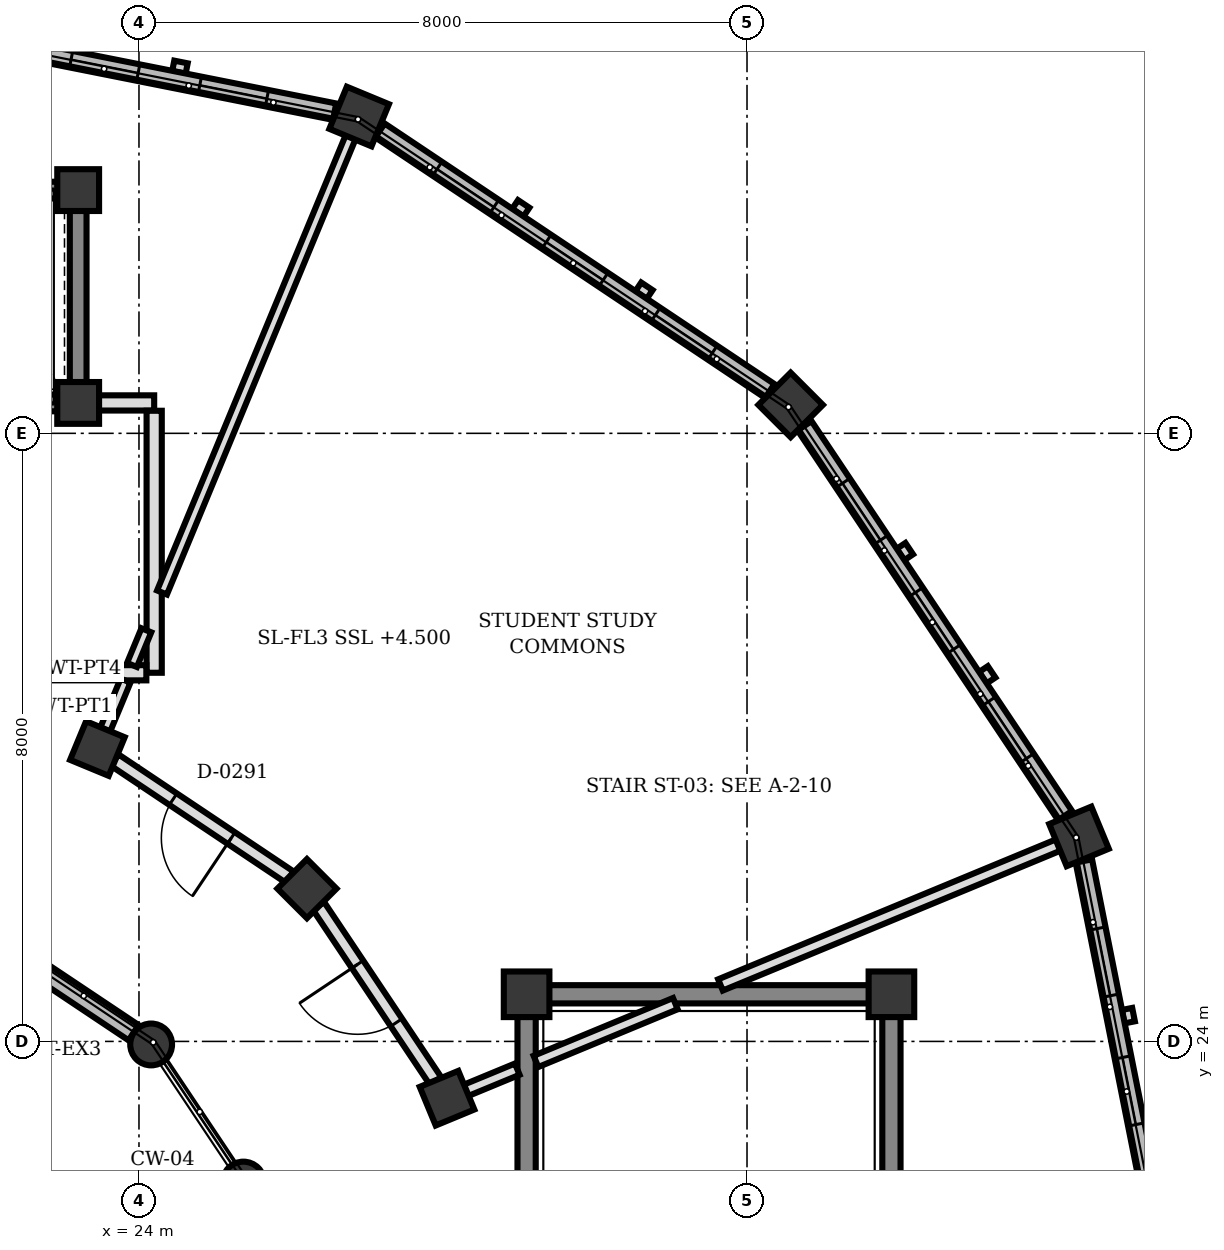
"""IFC4 building model, lengths in metres.
Left out: names, types, materials, properties, quantities, classifications, styles, units other than length and angle.
Written with IfcOpenShell. Run it as: python <this file> out.ifc"""

import sys

from ifc_helpers import new_model, si_unit, direction, frame, frame_2d, origin, origin_2d, place, context, subcontext, project, spatial, rectangle, circle, extrude, element, fill, save


model = new_model("IFC4")
c1 = context("Model", 3, precision=1e-05, world=origin(), true_north=direction((0.0, 1.0)))
c2 = subcontext(c1, "Body", "Model", "MODEL_VIEW")
j1 = project(units=[si_unit("LENGTHUNIT", "METRE"), si_unit("PLANEANGLEUNIT", "RADIAN")], contexts=[c1])
p1 = place(None, origin())
s1 = spatial("IfcSite", under=j1, at=p1, CompositionType="ELEMENT")
p2 = place(p1, origin())
s2 = spatial("IfcBuilding", under=s1, at=p2, CompositionType="ELEMENT")
p3 = place(p2, frame((0.0, 0.0, 4.5)))
s3 = spatial("IfcBuildingStorey", under=s2, at=p3, CompositionType="ELEMENT", Elevation=4.5)
for number, where, z_axis, x_axis in (
    (1, (33.9, 24.62, 0.0), (0.0, 0.0, 1.0), (1.0, 0.0, 0.0)),
    (2, (29.1, 24.62, 0.0), (0.0, 0.0, 1.0), (1.0, 0.0, 0.0)),
):
    element("IfcColumn", number, at=place(p3, frame(where, z_axis=z_axis, x_axis=x_axis)), inside=s3, PredefinedType="COLUMN", context=c2, shape_type="SweptSolid", body=[
        extrude(rectangle(XDim=0.6, YDim=0.6, at=origin_2d()), origin(), (0.0, 0.0, 1.0), 4.0),
    ])
for number, where, z_axis, x_axis in (
    (3, (23.2, 32.4, 0.0), (0.0, 0.0, 1.0), (1.0, 0.0, 0.0)),
    (4, (23.2, 35.2, 0.0), (0.0, 0.0, 1.0), (1.0, 0.0, 0.0)),
):
    element("IfcColumn", number, at=place(p3, frame(where, z_axis=z_axis, x_axis=x_axis)), inside=s3, PredefinedType="COLUMN", context=c2, shape_type="SweptSolid", body=[
        extrude(rectangle(XDim=0.55, YDim=0.55, at=origin_2d()), origin(), (0.0, 0.0, 1.0), 4.0),
    ])
for number, where, z_axis, x_axis in (
    (5, (25.374, 22.143, 0.0), (0.0, 0.0, 1.0), (1.0, 0.0, 0.0)),
    (6, (24.16, 23.96, 0.0), (0.0, 0.0, 1.0), (1.0, 0.0, 0.0)),
):
    element("IfcColumn", number, at=place(p3, frame(where, z_axis=z_axis, x_axis=x_axis)), inside=s3, PredefinedType="COLUMN", context=c2, shape_type="SweptSolid", body=[
        extrude(circle(Radius=0.275, at=origin_2d()), origin(), (0.0, 0.0, 1.0), 4.0),
    ])
for number, where, z_axis, x_axis in (
    (7, (28.053, 23.253, 0.0), (0.0, 0.0, 1.0), (0.924, 0.383, 0.0)),
    (8, (26.21, 26.01, 0.0), (0.0, 0.0, 1.0), (0.707, 0.707, 0.0)),
    (9, (23.453, 27.853, 0.0), (0.0, 0.0, 1.0), (0.383, 0.924, 0.0)),
):
    element("IfcColumn", number, at=place(p3, frame(where, z_axis=z_axis, x_axis=x_axis)), inside=s3, PredefinedType="COLUMN", context=c2, shape_type="SweptSolid", body=[
        extrude(rectangle(XDim=0.55, YDim=0.55, at=origin_2d()), origin(), (0.0, 0.0, 1.0), 4.0),
    ])
for number, where, z_axis, x_axis in (
    (10, (36.368, 26.697, 0.0), (0.0, 0.0, 1.0), (0.924, 0.383, 0.0)),
    (11, (32.574, 32.374, 0.0), (0.0, 0.0, 1.0), (0.707, 0.707, 0.0)),
    (12, (26.897, 36.168, 0.0), (0.0, 0.0, 1.0), (0.383, 0.924, 0.0)),
):
    element("IfcColumn", number, at=place(p3, frame(where, z_axis=z_axis, x_axis=x_axis)), inside=s3, PredefinedType="COLUMN", context=c2, shape_type="SweptSolid", body=[
        extrude(rectangle(XDim=0.6, YDim=0.6, at=origin_2d()), origin(), (0.0, 0.0, 1.0), 4.0),
    ])
p4 = place(p3, frame((36.432, 26.374, 0.0), z_axis=(0.0, 0.0, 1.0), x_axis=(0.195164813773, -0.980770460131, 0.0)))
e13 = element("IfcWall", 13, at=p4, inside=s3, PredefinedType="SOLIDWALL", context=c2, shape_type="SweptSolid", body=[
    extrude(rectangle(XDim=6.17, YDim=0.22, at=frame_2d((3.085, 0.0))), origin(), (0.0, 0.0, 1.0), 3.172),
])
p5 = place(p4, frame((0.907, 0.0, 0.85)))
e14 = element("IfcOpeningElement", 14, at=p5, cuts=e13, PredefinedType="OPENING", context=c2, shape_type="SweptSolid", body=[
    extrude(rectangle(XDim=0.9, YDim=1.4, at=frame_2d((0.45, 0.7))), frame((0.0, 0.12, 0.0), z_axis=(0.0, -1.0, 0.0), x_axis=(1.0, 0.0, 0.0)), (0.0, 0.0, 1.0), 0.24),
])
p6 = place(p4, frame((2.635, 0.0, 0.85)))
e15 = element("IfcOpeningElement", 15, at=p6, cuts=e13, PredefinedType="OPENING", context=c2, shape_type="SweptSolid", body=[
    extrude(rectangle(XDim=0.9, YDim=1.4, at=frame_2d((0.45, 0.7))), frame((0.0, 0.12, 0.0), z_axis=(0.0, -1.0, 0.0), x_axis=(1.0, 0.0, 0.0)), (0.0, 0.0, 1.0), 0.24),
])
p7 = place(p4, frame((4.362, 0.0, 0.85)))
e16 = element("IfcOpeningElement", 16, at=p7, cuts=e13, PredefinedType="OPENING", context=c2, shape_type="SweptSolid", body=[
    extrude(rectangle(XDim=0.9, YDim=1.4, at=frame_2d((0.45, 0.7))), frame((0.0, 0.12, 0.0), z_axis=(0.0, -1.0, 0.0), x_axis=(1.0, 0.0, 0.0)), (0.0, 0.0, 1.0), 0.24),
])
p8 = place(p3, frame((32.757, 32.1, 0.0), z_axis=(0.0, 0.0, 1.0), x_axis=(0.555658736667, -0.831410469242, 0.0)))
e17 = element("IfcWall", 17, at=p8, inside=s3, PredefinedType="SOLIDWALL", context=c2, shape_type="SweptSolid", body=[
    extrude(rectangle(XDim=6.169, YDim=0.22, at=frame_2d((3.084, 0.0))), origin(), (0.0, 0.0, 1.0), 3.172),
])
p9 = place(p8, frame((0.907, 0.0, 0.85)))
e18 = element("IfcOpeningElement", 18, at=p9, cuts=e17, PredefinedType="OPENING", context=c2, shape_type="SweptSolid", body=[
    extrude(rectangle(XDim=0.9, YDim=1.4, at=frame_2d((0.45, 0.7))), frame((0.0, 0.12, 0.0), z_axis=(0.0, -1.0, 0.0), x_axis=(1.0, 0.0, 0.0)), (0.0, 0.0, 1.0), 0.24),
])
p10 = place(p8, frame((2.635, 0.0, 0.85)))
e19 = element("IfcOpeningElement", 19, at=p10, cuts=e17, PredefinedType="OPENING", context=c2, shape_type="SweptSolid", body=[
    extrude(rectangle(XDim=0.9, YDim=1.4, at=frame_2d((0.45, 0.7))), frame((0.0, 0.12, 0.0), z_axis=(0.0, -1.0, 0.0), x_axis=(1.0, 0.0, 0.0)), (0.0, 0.0, 1.0), 0.24),
])
p11 = place(p8, frame((4.362, 0.0, 0.85)))
e20 = element("IfcOpeningElement", 20, at=p11, cuts=e17, PredefinedType="OPENING", context=c2, shape_type="SweptSolid", body=[
    extrude(rectangle(XDim=0.9, YDim=1.4, at=frame_2d((0.45, 0.7))), frame((0.0, 0.12, 0.0), z_axis=(0.0, -1.0, 0.0), x_axis=(1.0, 0.0, 0.0)), (0.0, 0.0, 1.0), 0.24),
])
p12 = place(p3, frame((27.171, 35.985, 0.0), z_axis=(0.0, 0.0, 1.0), x_axis=(0.831392186772, -0.55568609104, 0.0)))
e21 = element("IfcWall", 21, at=p12, inside=s3, PredefinedType="SOLIDWALL", context=c2, shape_type="SweptSolid", body=[
    extrude(rectangle(XDim=6.169, YDim=0.22, at=frame_2d((3.085, 0.0))), origin(), (0.0, 0.0, 1.0), 3.172),
])
p13 = place(p12, frame((0.907, 0.0, 0.85)))
e22 = element("IfcOpeningElement", 22, at=p13, cuts=e21, PredefinedType="OPENING", context=c2, shape_type="SweptSolid", body=[
    extrude(rectangle(XDim=0.9, YDim=1.4, at=frame_2d((0.45, 0.7))), frame((0.0, 0.12, 0.0), z_axis=(0.0, -1.0, 0.0), x_axis=(1.0, 0.0, 0.0)), (0.0, 0.0, 1.0), 0.24),
])
p14 = place(p12, frame((2.635, 0.0, 0.85)))
e23 = element("IfcOpeningElement", 23, at=p14, cuts=e21, PredefinedType="OPENING", context=c2, shape_type="SweptSolid", body=[
    extrude(rectangle(XDim=0.9, YDim=1.4, at=frame_2d((0.45, 0.7))), frame((0.0, 0.12, 0.0), z_axis=(0.0, -1.0, 0.0), x_axis=(1.0, 0.0, 0.0)), (0.0, 0.0, 1.0), 0.24),
])
p15 = place(p12, frame((4.362, 0.0, 0.85)))
e24 = element("IfcOpeningElement", 24, at=p15, cuts=e21, PredefinedType="OPENING", context=c2, shape_type="SweptSolid", body=[
    extrude(rectangle(XDim=0.9, YDim=1.4, at=frame_2d((0.45, 0.7))), frame((0.0, 0.12, 0.0), z_axis=(0.0, -1.0, 0.0), x_axis=(1.0, 0.0, 0.0)), (0.0, 0.0, 1.0), 0.24),
])
p16 = place(p3, frame((23.93, 24.114, 0.0), z_axis=(0.0, 0.0, 1.0), x_axis=(-0.83165874011, 0.555287078904, 0.0)))
e25 = element("IfcWall", 25, at=p16, inside=s3, PredefinedType="SOLIDWALL", context=c2, shape_type="SweptSolid", body=[
    extrude(rectangle(XDim=1.632, YDim=0.24, at=frame_2d((0.816, 0.0))), origin(), (0.0, 0.0, 1.0), 3.222),
])
p17 = place(p3, frame((20.523, 37.436, 0.0), z_axis=(0.0, 0.0, 1.0), x_axis=(0.980770460131, -0.195164813773, 0.0)))
e26 = element("IfcWall", 26, at=p17, inside=s3, PredefinedType="SOLIDWALL", context=c2, shape_type="SweptSolid", body=[
    extrude(rectangle(XDim=6.17, YDim=0.22, at=frame_2d((3.085, 0.0))), origin(), (0.0, 0.0, 1.0), 3.172),
])
p18 = place(p17, frame((0.907, 0.0, 0.85)))
e27 = element("IfcOpeningElement", 27, at=p18, cuts=e26, PredefinedType="OPENING", context=c2, shape_type="SweptSolid", body=[
    extrude(rectangle(XDim=0.9, YDim=1.4, at=frame_2d((0.45, 0.7))), frame((0.0, 0.12, 0.0), z_axis=(0.0, -1.0, 0.0), x_axis=(1.0, 0.0, 0.0)), (0.0, 0.0, 1.0), 0.24),
])
p19 = place(p17, frame((2.635, 0.0, 0.85)))
e28 = element("IfcOpeningElement", 28, at=p19, cuts=e26, PredefinedType="OPENING", context=c2, shape_type="SweptSolid", body=[
    extrude(rectangle(XDim=0.9, YDim=1.4, at=frame_2d((0.45, 0.7))), frame((0.0, 0.12, 0.0), z_axis=(0.0, -1.0, 0.0), x_axis=(1.0, 0.0, 0.0)), (0.0, 0.0, 1.0), 0.24),
])
p20 = place(p17, frame((4.362, 0.0, 0.85)))
e29 = element("IfcOpeningElement", 29, at=p20, cuts=e26, PredefinedType="OPENING", context=c2, shape_type="SweptSolid", body=[
    extrude(rectangle(XDim=0.9, YDim=1.4, at=frame_2d((0.45, 0.7))), frame((0.0, 0.12, 0.0), z_axis=(0.0, -1.0, 0.0), x_axis=(1.0, 0.0, 0.0)), (0.0, 0.0, 1.0), 0.24),
])
p21 = place(p3, frame((29.1, 16.192, 0.0), z_axis=(0.0, 0.0, 1.0), x_axis=(0.0, 1.0, 0.0)))
e30 = element("IfcWall", 30, at=p21, inside=s3, PredefinedType="SHEAR", context=c2, shape_type="SweptSolid", body=[
    extrude(rectangle(XDim=8.136, YDim=0.24, at=frame_2d((4.068, 0.0))), origin(), (0.0, 0.0, 1.0), 3.74),
])
p22 = place(p21, frame((1.012, 0.0, 0.0)))
e31 = element("IfcOpeningElement", 31, at=p22, cuts=e30, PredefinedType="OPENING", context=c2, shape_type="SweptSolid", body=[
    extrude(rectangle(XDim=0.88, YDim=2.1, at=frame_2d((0.44, 1.05))), frame((0.0, 0.13, 0.0), z_axis=(0.0, -1.0, 0.0), x_axis=(1.0, 0.0, 0.0)), (0.0, 0.0, 1.0), 0.26),
])
p23 = place(p3, frame((33.9, 24.328, 0.0), z_axis=(0.0, 0.0, 1.0), x_axis=(0.0, -1.0, 0.0)))
e32 = element("IfcWall", 32, at=p23, inside=s3, PredefinedType="SHEAR", context=c2, shape_type="SweptSolid", body=[
    extrude(rectangle(XDim=8.136, YDim=0.24, at=frame_2d((4.068, 0.0))), origin(), (0.0, 0.0, 1.0), 3.74),
])
p24 = place(p3, frame((33.608, 24.62, 0.0), z_axis=(0.0, 0.0, 1.0), x_axis=(-1.0, 0.0, 0.0)))
e33 = element("IfcWall", 33, at=p24, inside=s3, PredefinedType="SHEAR", context=c2, shape_type="SweptSolid", body=[
    extrude(rectangle(XDim=4.216, YDim=0.24, at=frame_2d((2.108, 0.0))), origin(), (0.0, 0.0, 1.0), 3.74),
])
p25 = place(p3, frame((20.867, 32.4, 0.0), z_axis=(0.0, 0.0, 1.0), x_axis=(1.0, 0.0, 0.0)))
e34 = element("IfcWall", 34, at=p25, inside=s3, PredefinedType="SHEAR", context=c2, shape_type="SweptSolid", body=[
    extrude(rectangle(XDim=2.066, YDim=0.22, at=frame_2d((1.033, 0.0))), origin(), (0.0, 0.0, 1.0), 3.74),
])
p26 = place(p25, frame((0.483, 0.0, 0.0)))
e35 = element("IfcOpeningElement", 35, at=p26, cuts=e34, PredefinedType="OPENING", context=c2, shape_type="SweptSolid", body=[
    extrude(rectangle(XDim=1.1, YDim=2.15, at=frame_2d((0.55, 1.075))), frame((0.0, 0.12, 0.0), z_axis=(0.0, -1.0, 0.0), x_axis=(1.0, 0.0, 0.0)), (0.0, 0.0, 1.0), 0.24),
])
p27 = place(p3, frame((23.2, 32.667, 0.0), z_axis=(0.0, 0.0, 1.0), x_axis=(0.0, 1.0, 0.0)))
e36 = element("IfcWall", 36, at=p27, inside=s3, PredefinedType="SHEAR", context=c2, shape_type="SweptSolid", body=[
    extrude(rectangle(XDim=2.266, YDim=0.22, at=frame_2d((1.133, 0.0))), origin(), (0.0, 0.0, 1.0), 3.74),
])
p28 = place(p3, frame((22.933, 35.2, 0.0), z_axis=(0.0, 0.0, 1.0), x_axis=(-1.0, 0.0, 0.0)))
e37 = element("IfcWall", 37, at=p28, inside=s3, PredefinedType="SHEAR", context=c2, shape_type="SweptSolid", body=[
    extrude(rectangle(XDim=2.066, YDim=0.22, at=frame_2d((1.033, 0.0))), origin(), (0.0, 0.0, 1.0), 3.74),
])
p29 = place(p3, frame((23.467, 32.4, 0.0), z_axis=(0.0, 0.0, 1.0), x_axis=(1.0, 0.0, 0.0)))
e38 = element("IfcWall", 38, at=p29, inside=s3, PredefinedType="PARTITIONING", context=c2, shape_type="SweptSolid", body=[
    extrude(rectangle(XDim=0.733, YDim=0.2, at=frame_2d((0.366, 0.0))), origin(), (0.0, 0.0, 1.0), 3.7),
])
p30 = place(p3, frame((24.2, 28.85, 0.0), z_axis=(0.0, 0.0, 1.0), x_axis=(0.0, 1.0, 0.0)))
e39 = element("IfcWall", 39, at=p30, inside=s3, PredefinedType="PARTITIONING", context=c2, shape_type="SweptSolid", body=[
    extrude(rectangle(XDim=3.447, YDim=0.2, at=frame_2d((1.724, 0.0))), origin(), (0.0, 0.0, 1.0), 3.072),
])
p31 = place(p3, frame((24.097, 28.85, 0.0), z_axis=(0.0, 0.0, 1.0), x_axis=(-1.0, 0.0, 0.0)))
e40 = element("IfcWall", 40, at=p31, inside=s3, PredefinedType="PARTITIONING", context=c2, shape_type="SweptSolid", body=[
    extrude(rectangle(XDim=3.394, YDim=0.2, at=frame_2d((1.697, 0.0))), origin(), (0.0, 0.0, 1.0), 3.072),
])
p32 = place(p31, frame((1.519, 0.0, 0.0)))
e41 = element("IfcOpeningElement", 41, at=p32, cuts=e40, PredefinedType="OPENING", context=c2, shape_type="SweptSolid", body=[
    extrude(rectangle(XDim=0.9, YDim=2.2, at=frame_2d((0.45, 1.1))), frame((0.0, 0.11, 0.0), z_axis=(0.0, -1.0, 0.0), x_axis=(1.0, 0.0, 0.0)), (0.0, 0.0, 1.0), 0.22),
])
p33 = place(p3, frame((28.3, 23.355, 0.0), z_axis=(0.0, 0.0, 1.0), x_axis=(0.924069600435, 0.382224245113, 0.0)))
e42 = element("IfcWall", 42, at=p33, inside=s3, PredefinedType="PARTITIONING", context=c2, shape_type="SweptSolid", body=[
    extrude(rectangle(XDim=0.733, YDim=0.16, at=frame_2d((0.366, 0.0))), origin(), (0.0, 0.0, 1.0), 3.7),
])
p34 = place(p3, frame((29.223, 23.737, 0.0), z_axis=(0.0, 0.0, 1.0), x_axis=(0.923817443679, 0.382833293686, 0.0)))
e43 = element("IfcWall", 43, at=p34, inside=s3, PredefinedType="PARTITIONING", context=c2, shape_type="SweptSolid", body=[
    extrude(rectangle(XDim=1.985, YDim=0.16, at=frame_2d((0.993, 0.0))), origin(), (0.0, 0.0, 1.0), 3.7),
])
p35 = place(p3, frame((31.651, 24.743, 0.0), z_axis=(0.0, 0.0, 1.0), x_axis=(0.923877739946, 0.382687759972, 0.0)))
e44 = element("IfcWall", 44, at=p35, inside=s3, PredefinedType="PARTITIONING", context=c2, shape_type="SweptSolid", body=[
    extrude(rectangle(XDim=4.813, YDim=0.16, at=frame_2d((2.407, 0.0))), origin(), (0.0, 0.0, 1.0), 3.7),
])
p36 = place(p3, frame((23.555, 28.1, 0.0), z_axis=(0.0, 0.0, 1.0), x_axis=(0.38278283439, 0.923838352579, 0.0)))
e45 = element("IfcWall", 45, at=p36, inside=s3, PredefinedType="PARTITIONING", context=c2, shape_type="SweptSolid", body=[
    extrude(rectangle(XDim=0.7, YDim=0.14, at=frame_2d((0.35, 0.0))), origin(), (0.0, 0.0, 1.0), 3.072),
])
p37 = place(p3, frame((23.908, 28.953, 0.0), z_axis=(0.0, 0.0, 1.0), x_axis=(0.3827885685, 0.92383597669, 0.0)))
e46 = element("IfcWall", 46, at=p37, inside=s3, PredefinedType="PARTITIONING", context=c2, shape_type="SweptSolid", body=[
    extrude(rectangle(XDim=0.494, YDim=0.14, at=frame_2d((0.247, 0.0))), origin(), (0.0, 0.0, 1.0), 3.072),
])
p38 = place(p3, frame((24.303, 29.906, 0.0), z_axis=(0.0, 0.0, 1.0), x_axis=(0.382682035927, 0.923880110934, 0.0)))
e47 = element("IfcWall", 47, at=p38, inside=s3, PredefinedType="PARTITIONING", context=c2, shape_type="SweptSolid", body=[
    extrude(rectangle(XDim=6.486, YDim=0.14, at=frame_2d((3.243, 0.0))), origin(), (0.0, 0.0, 1.0), 3.072),
])
p39 = place(p3, frame((27.902, 23.479, 0.0), z_axis=(0.0, 0.0, 1.0), x_axis=(-0.555797002478, 0.831318045056, 0.0)))
e48 = element("IfcWall", 48, at=p39, inside=s3, PredefinedType="PARTITIONING", context=c2, shape_type="SweptSolid", body=[
    extrude(rectangle(XDim=2.773, YDim=0.18, at=frame_2d((1.386, 0.0))), origin(), (0.0, 0.0, 1.0), 3.072),
])
p40 = place(p39, frame((0.926, 0.0, 0.0)))
e49 = element("IfcOpeningElement", 49, at=p40, cuts=e48, PredefinedType="OPENING", context=c2, shape_type="SweptSolid", body=[
    extrude(rectangle(XDim=0.92, YDim=2.1, at=frame_2d((0.46, 1.05))), frame((0.0, 0.1, 0.0), z_axis=(0.0, -1.0, 0.0), x_axis=(1.0, 0.0, 0.0)), (0.0, 0.0, 1.0), 0.2),
])
p41 = place(p3, frame((25.984, 26.161, 0.0), z_axis=(0.0, 0.0, 1.0), x_axis=(-0.831318045056, 0.555797002478, 0.0)))
e50 = element("IfcWall", 50, at=p41, inside=s3, PredefinedType="PARTITIONING", context=c2, shape_type="SweptSolid", body=[
    extrude(rectangle(XDim=2.773, YDim=0.18, at=frame_2d((1.386, 0.0))), origin(), (0.0, 0.0, 1.0), 3.072),
])
p42 = place(p41, frame((0.926, 0.0, 0.0)))
e51 = element("IfcOpeningElement", 51, at=p42, cuts=e50, PredefinedType="OPENING", context=c2, shape_type="SweptSolid", body=[
    extrude(rectangle(XDim=0.92, YDim=2.1, at=frame_2d((0.46, 1.05))), frame((0.0, 0.1, 0.0), z_axis=(0.0, -1.0, 0.0), x_axis=(1.0, 0.0, 0.0)), (0.0, 0.0, 1.0), 0.2),
])
p43 = place(p5, origin())
e52 = element("IfcWindow", 52, at=p43, inside=s3, PartitioningType="SINGLE_PANEL", PredefinedType="WINDOW", context=c2, shape_type="SweptSolid", body=[
    extrude(rectangle(XDim=0.9, YDim=1.4, at=frame_2d((0.45, 0.7))), frame((0.0, 0.03, 0.0), z_axis=(0.0, -1.0, 0.0), x_axis=(1.0, 0.0, 0.0)), (0.0, 0.0, 1.0), 0.06),
])
fill(e14, e52)
p44 = place(p6, origin())
e53 = element("IfcWindow", 53, at=p44, inside=s3, PartitioningType="SINGLE_PANEL", PredefinedType="WINDOW", context=c2, shape_type="SweptSolid", body=[
    extrude(rectangle(XDim=0.9, YDim=1.4, at=frame_2d((0.45, 0.7))), frame((0.0, 0.03, 0.0), z_axis=(0.0, -1.0, 0.0), x_axis=(1.0, 0.0, 0.0)), (0.0, 0.0, 1.0), 0.06),
])
fill(e15, e53)
p45 = place(p9, origin())
e54 = element("IfcWindow", 54, at=p45, inside=s3, PartitioningType="SINGLE_PANEL", PredefinedType="WINDOW", context=c2, shape_type="SweptSolid", body=[
    extrude(rectangle(XDim=0.9, YDim=1.4, at=frame_2d((0.45, 0.7))), frame((0.0, 0.03, 0.0), z_axis=(0.0, -1.0, 0.0), x_axis=(1.0, 0.0, 0.0)), (0.0, 0.0, 1.0), 0.06),
])
fill(e18, e54)
p46 = place(p10, origin())
e55 = element("IfcWindow", 55, at=p46, inside=s3, PartitioningType="SINGLE_PANEL", PredefinedType="WINDOW", context=c2, shape_type="SweptSolid", body=[
    extrude(rectangle(XDim=0.9, YDim=1.4, at=frame_2d((0.45, 0.7))), frame((0.0, 0.03, 0.0), z_axis=(0.0, -1.0, 0.0), x_axis=(1.0, 0.0, 0.0)), (0.0, 0.0, 1.0), 0.06),
])
fill(e19, e55)
p47 = place(p11, origin())
e56 = element("IfcWindow", 56, at=p47, inside=s3, PartitioningType="SINGLE_PANEL", PredefinedType="WINDOW", context=c2, shape_type="SweptSolid", body=[
    extrude(rectangle(XDim=0.9, YDim=1.4, at=frame_2d((0.45, 0.7))), frame((0.0, 0.03, 0.0), z_axis=(0.0, -1.0, 0.0), x_axis=(1.0, 0.0, 0.0)), (0.0, 0.0, 1.0), 0.06),
])
fill(e20, e56)
p48 = place(p13, origin())
e57 = element("IfcWindow", 57, at=p48, inside=s3, PartitioningType="SINGLE_PANEL", PredefinedType="WINDOW", context=c2, shape_type="SweptSolid", body=[
    extrude(rectangle(XDim=0.9, YDim=1.4, at=frame_2d((0.45, 0.7))), frame((0.0, 0.03, 0.0), z_axis=(0.0, -1.0, 0.0), x_axis=(1.0, 0.0, 0.0)), (0.0, 0.0, 1.0), 0.06),
])
fill(e22, e57)
p49 = place(p14, origin())
e58 = element("IfcWindow", 58, at=p49, inside=s3, PartitioningType="SINGLE_PANEL", PredefinedType="WINDOW", context=c2, shape_type="SweptSolid", body=[
    extrude(rectangle(XDim=0.9, YDim=1.4, at=frame_2d((0.45, 0.7))), frame((0.0, 0.03, 0.0), z_axis=(0.0, -1.0, 0.0), x_axis=(1.0, 0.0, 0.0)), (0.0, 0.0, 1.0), 0.06),
])
fill(e23, e58)
p50 = place(p15, origin())
e59 = element("IfcWindow", 59, at=p50, inside=s3, PartitioningType="SINGLE_PANEL", PredefinedType="WINDOW", context=c2, shape_type="SweptSolid", body=[
    extrude(rectangle(XDim=0.9, YDim=1.4, at=frame_2d((0.45, 0.7))), frame((0.0, 0.03, 0.0), z_axis=(0.0, -1.0, 0.0), x_axis=(1.0, 0.0, 0.0)), (0.0, 0.0, 1.0), 0.06),
])
fill(e24, e59)
p51 = place(p19, origin())
e60 = element("IfcWindow", 60, at=p51, inside=s3, PartitioningType="SINGLE_PANEL", PredefinedType="WINDOW", context=c2, shape_type="SweptSolid", body=[
    extrude(rectangle(XDim=0.9, YDim=1.4, at=frame_2d((0.45, 0.7))), frame((0.0, 0.03, 0.0), z_axis=(0.0, -1.0, 0.0), x_axis=(1.0, 0.0, 0.0)), (0.0, 0.0, 1.0), 0.06),
])
fill(e28, e60)
p52 = place(p20, origin())
e61 = element("IfcWindow", 61, at=p52, inside=s3, PartitioningType="SINGLE_PANEL", PredefinedType="WINDOW", context=c2, shape_type="SweptSolid", body=[
    extrude(rectangle(XDim=0.9, YDim=1.4, at=frame_2d((0.45, 0.7))), frame((0.0, 0.03, 0.0), z_axis=(0.0, -1.0, 0.0), x_axis=(1.0, 0.0, 0.0)), (0.0, 0.0, 1.0), 0.06),
])
fill(e29, e61)
p53 = place(p40, origin())
e62 = element("IfcDoor", 62, at=p53, inside=s3, OperationType="SINGLE_SWING_RIGHT", PredefinedType="DOOR", context=c2, shape_type="SweptSolid", body=[
    extrude(rectangle(XDim=0.92, YDim=2.1, at=frame_2d((0.46, 1.05))), frame((0.0, 0.025, 0.0), z_axis=(0.0, -1.0, 0.0), x_axis=(1.0, 0.0, 0.0)), (0.0, 0.0, 1.0), 0.05),
])
fill(e49, e62)
p54 = place(p42, origin())
e63 = element("IfcDoor", 63, at=p54, inside=s3, OperationType="SINGLE_SWING_LEFT", PredefinedType="DOOR", context=c2, shape_type="SweptSolid", body=[
    extrude(rectangle(XDim=0.92, YDim=2.1, at=frame_2d((0.46, 1.05))), frame((0.0, 0.025, 0.0), z_axis=(0.0, -1.0, 0.0), x_axis=(1.0, 0.0, 0.0)), (0.0, 0.0, 1.0), 0.05),
])
fill(e51, e63)
save(model, sys.argv[1])
